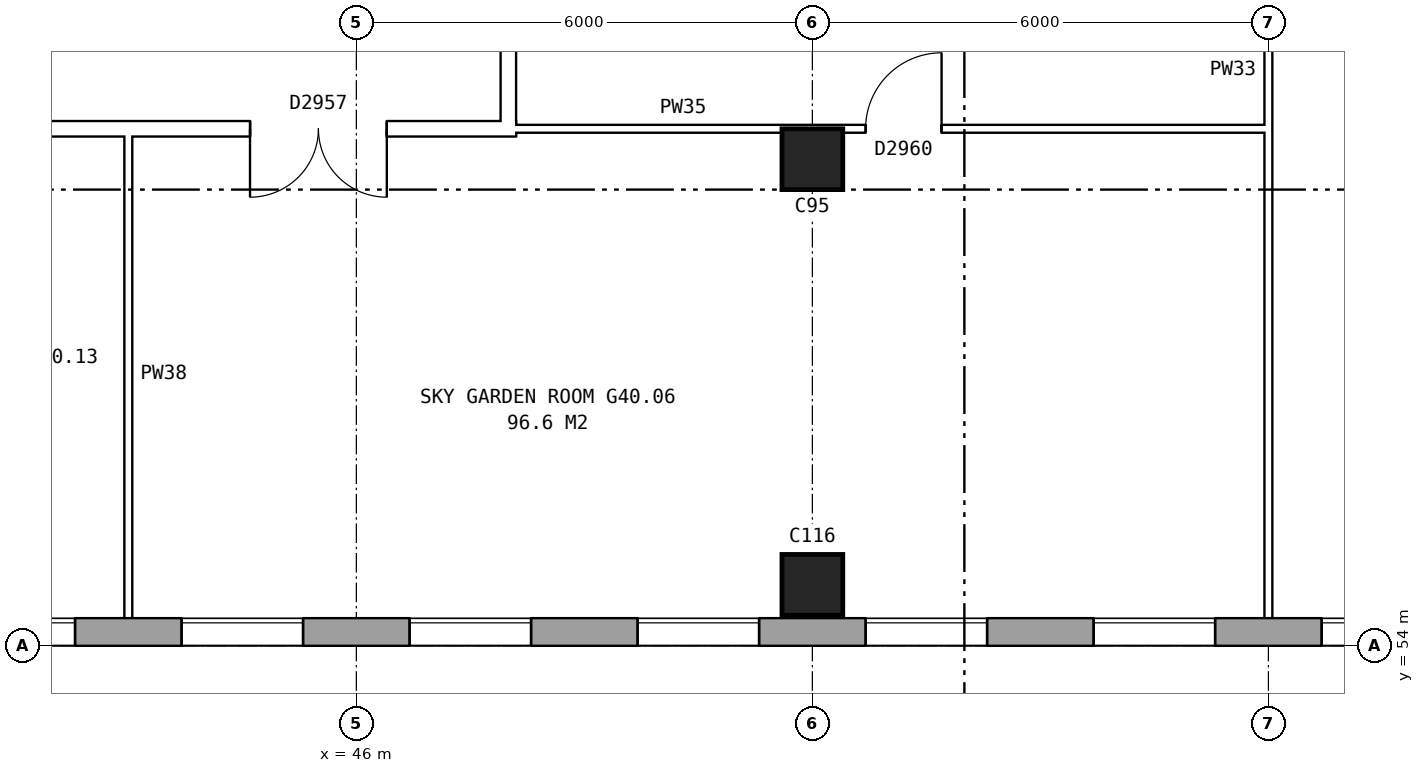
"""IFC4 building model, lengths in metres.
Left out: names, types, materials, properties, quantities, classifications, styles, units other than length and angle.
Written with IfcOpenShell. Run it as: python <this file> out.ifc"""

import sys

from ifc_helpers import new_model, si_unit, direction, frame, frame_2d, origin, origin_2d, place, context, subcontext, project, spatial, rectangle, extrude, element, fill, save


model = new_model("IFC4")
c1 = context("Model", 3, precision=1e-05, world=origin(), true_north=direction((0.0, 1.0)))
c2 = subcontext(c1, "Body", "Model", "MODEL_VIEW")
j1 = project(units=[si_unit("LENGTHUNIT", "METRE"), si_unit("PLANEANGLEUNIT", "RADIAN")], contexts=[c1])
p1 = place(None, origin())
s1 = spatial("IfcSite", under=j1, at=p1, CompositionType="ELEMENT")
p2 = place(p1, origin())
s2 = spatial("IfcBuilding", under=s1, at=p2, CompositionType="ELEMENT")
p3 = place(p2, frame((0.0, 0.0, 142.3)))
s3 = spatial("IfcBuildingStorey", under=s2, at=p3, CompositionType="ELEMENT", Elevation=142.3)
for number, where, z_axis, x_axis in (
    (1, (52.0, 54.8, 0.0), (0.0, 0.0, 1.0), (1.0, 0.0, 0.0)),
    (2, (52.0, 60.4, 0.0), (0.0, 0.0, 1.0), (1.0, 0.0, 0.0)),
):
    element("IfcColumn", number, at=place(p3, frame(where, z_axis=z_axis, x_axis=x_axis)), inside=s3, PredefinedType="COLUMN", context=c2, shape_type="SweptSolid", body=[
        extrude(rectangle(XDim=0.8, YDim=0.8, at=origin_2d()), origin(), (0.0, 0.0, 1.0), 5.6),
    ])
p4 = place(p3, frame((31.575, 54.18, 0.0), z_axis=(0.0, 0.0, 1.0), x_axis=(1.0, 0.0, 0.0)))
e3 = element("IfcWall", 3, at=p4, inside=s3, PredefinedType="STANDARD", context=c2, shape_type="SweptSolid", body=[
    extrude(rectangle(XDim=41.351, YDim=0.36, at=frame_2d((20.675, 0.0))), origin(), (0.0, 0.0, 1.0), 5.6),
])
p5 = place(p4, frame((3.125, 0.0, 0.15)))
e4 = element("IfcOpeningElement", 4, at=p5, cuts=e3, PredefinedType="OPENING", context=c2, shape_type="SweptSolid", body=[
    extrude(rectangle(XDim=1.6, YDim=2.4, at=frame_2d((0.8, 1.2))), frame((0.0, 0.19, 0.0), z_axis=(0.0, -1.0, 0.0), x_axis=(1.0, 0.0, 0.0)), (0.0, 0.0, 1.0), 0.38),
])
p6 = place(p4, frame((6.125, 0.0, 0.15)))
e5 = element("IfcOpeningElement", 5, at=p6, cuts=e3, PredefinedType="OPENING", context=c2, shape_type="SweptSolid", body=[
    extrude(rectangle(XDim=1.6, YDim=2.4, at=frame_2d((0.8, 1.2))), frame((0.0, 0.19, 0.0), z_axis=(0.0, -1.0, 0.0), x_axis=(1.0, 0.0, 0.0)), (0.0, 0.0, 1.0), 0.38),
])
p7 = place(p4, frame((9.125, 0.0, 0.15)))
e6 = element("IfcOpeningElement", 6, at=p7, cuts=e3, PredefinedType="OPENING", context=c2, shape_type="SweptSolid", body=[
    extrude(rectangle(XDim=1.6, YDim=2.4, at=frame_2d((0.8, 1.2))), frame((0.0, 0.19, 0.0), z_axis=(0.0, -1.0, 0.0), x_axis=(1.0, 0.0, 0.0)), (0.0, 0.0, 1.0), 0.38),
])
p8 = place(p4, frame((12.125, 0.0, 0.15)))
e7 = element("IfcOpeningElement", 7, at=p8, cuts=e3, PredefinedType="OPENING", context=c2, shape_type="SweptSolid", body=[
    extrude(rectangle(XDim=1.6, YDim=2.4, at=frame_2d((0.8, 1.2))), frame((0.0, 0.19, 0.0), z_axis=(0.0, -1.0, 0.0), x_axis=(1.0, 0.0, 0.0)), (0.0, 0.0, 1.0), 0.38),
])
p9 = place(p4, frame((15.125, 0.0, 0.15)))
e8 = element("IfcOpeningElement", 8, at=p9, cuts=e3, PredefinedType="OPENING", context=c2, shape_type="SweptSolid", body=[
    extrude(rectangle(XDim=1.6, YDim=2.4, at=frame_2d((0.8, 1.2))), frame((0.0, 0.19, 0.0), z_axis=(0.0, -1.0, 0.0), x_axis=(1.0, 0.0, 0.0)), (0.0, 0.0, 1.0), 0.38),
])
p10 = place(p4, frame((18.125, 0.0, 0.15)))
e9 = element("IfcOpeningElement", 9, at=p10, cuts=e3, PredefinedType="OPENING", context=c2, shape_type="SweptSolid", body=[
    extrude(rectangle(XDim=1.6, YDim=2.4, at=frame_2d((0.8, 1.2))), frame((0.0, 0.19, 0.0), z_axis=(0.0, -1.0, 0.0), x_axis=(1.0, 0.0, 0.0)), (0.0, 0.0, 1.0), 0.38),
])
p11 = place(p4, frame((21.125, 0.0, 0.15)))
e10 = element("IfcOpeningElement", 10, at=p11, cuts=e3, PredefinedType="OPENING", context=c2, shape_type="SweptSolid", body=[
    extrude(rectangle(XDim=1.6, YDim=2.4, at=frame_2d((0.8, 1.2))), frame((0.0, 0.19, 0.0), z_axis=(0.0, -1.0, 0.0), x_axis=(1.0, 0.0, 0.0)), (0.0, 0.0, 1.0), 0.38),
])
p12 = place(p4, frame((24.125, 0.0, 0.15)))
e11 = element("IfcOpeningElement", 11, at=p12, cuts=e3, PredefinedType="OPENING", context=c2, shape_type="SweptSolid", body=[
    extrude(rectangle(XDim=1.6, YDim=2.4, at=frame_2d((0.8, 1.2))), frame((0.0, 0.19, 0.0), z_axis=(0.0, -1.0, 0.0), x_axis=(1.0, 0.0, 0.0)), (0.0, 0.0, 1.0), 0.38),
])
p13 = place(p4, frame((27.125, 0.0, 0.15)))
e12 = element("IfcOpeningElement", 12, at=p13, cuts=e3, PredefinedType="OPENING", context=c2, shape_type="SweptSolid", body=[
    extrude(rectangle(XDim=1.6, YDim=2.4, at=frame_2d((0.8, 1.2))), frame((0.0, 0.19, 0.0), z_axis=(0.0, -1.0, 0.0), x_axis=(1.0, 0.0, 0.0)), (0.0, 0.0, 1.0), 0.38),
])
p14 = place(p4, frame((30.125, 0.0, 0.15)))
e13 = element("IfcOpeningElement", 13, at=p14, cuts=e3, PredefinedType="OPENING", context=c2, shape_type="SweptSolid", body=[
    extrude(rectangle(XDim=1.6, YDim=2.4, at=frame_2d((0.8, 1.2))), frame((0.0, 0.19, 0.0), z_axis=(0.0, -1.0, 0.0), x_axis=(1.0, 0.0, 0.0)), (0.0, 0.0, 1.0), 0.38),
])
p15 = place(p4, frame((33.125, 0.0, 0.15)))
e14 = element("IfcOpeningElement", 14, at=p15, cuts=e3, PredefinedType="OPENING", context=c2, shape_type="SweptSolid", body=[
    extrude(rectangle(XDim=1.6, YDim=2.4, at=frame_2d((0.8, 1.2))), frame((0.0, 0.19, 0.0), z_axis=(0.0, -1.0, 0.0), x_axis=(1.0, 0.0, 0.0)), (0.0, 0.0, 1.0), 0.38),
])
p16 = place(p4, frame((36.125, 0.0, 0.15)))
e15 = element("IfcOpeningElement", 15, at=p16, cuts=e3, PredefinedType="OPENING", context=c2, shape_type="SweptSolid", body=[
    extrude(rectangle(XDim=1.6, YDim=2.4, at=frame_2d((0.8, 1.2))), frame((0.0, 0.19, 0.0), z_axis=(0.0, -1.0, 0.0), x_axis=(1.0, 0.0, 0.0)), (0.0, 0.0, 1.0), 0.38),
])
p17 = place(p4, frame((39.125, 0.0, 0.15)))
e16 = element("IfcOpeningElement", 16, at=p17, cuts=e3, PredefinedType="OPENING", context=c2, shape_type="SweptSolid", body=[
    extrude(rectangle(XDim=1.6, YDim=2.4, at=frame_2d((0.8, 1.2))), frame((0.0, 0.19, 0.0), z_axis=(0.0, -1.0, 0.0), x_axis=(1.0, 0.0, 0.0)), (0.0, 0.0, 1.0), 0.38),
])
p18 = place(p3, frame((28.74, 60.8, 0.0), z_axis=(0.0, 0.0, 1.0), x_axis=(1.0, 0.0, 0.0)))
e17 = element("IfcWall", 17, at=p18, inside=s3, PredefinedType="PARTITIONING", context=c2, shape_type="SweptSolid", body=[
    extrude(rectangle(XDim=19.362, YDim=0.2, at=frame_2d((9.681, 0.0))), origin(), (0.0, 0.0, 1.0), 5.6),
])
p19 = place(p18, frame((3.69, 0.0, 0.0)))
e18 = element("IfcOpeningElement", 18, at=p19, cuts=e17, PredefinedType="OPENING", context=c2, shape_type="SweptSolid", body=[
    extrude(rectangle(XDim=1.0, YDim=2.1, at=frame_2d((0.5, 1.05))), frame((0.0, 0.11, 0.0), z_axis=(0.0, -1.0, 0.0), x_axis=(1.0, 0.0, 0.0)), (0.0, 0.0, 1.0), 0.22),
])
p20 = place(p18, frame((11.96, 0.0, 0.0)))
e19 = element("IfcOpeningElement", 19, at=p20, cuts=e17, PredefinedType="OPENING", context=c2, shape_type="SweptSolid", body=[
    extrude(rectangle(XDim=1.0, YDim=2.1, at=frame_2d((0.5, 1.05))), frame((0.0, 0.11, 0.0), z_axis=(0.0, -1.0, 0.0), x_axis=(1.0, 0.0, 0.0)), (0.0, 0.0, 1.0), 0.22),
])
p21 = place(p18, frame((15.861, 0.0, 0.0)))
e20 = element("IfcOpeningElement", 20, at=p21, cuts=e17, PredefinedType="OPENING", context=c2, shape_type="SweptSolid", body=[
    extrude(rectangle(XDim=1.8, YDim=2.1, at=frame_2d((0.9, 1.05))), frame((0.0, 0.11, 0.0), z_axis=(0.0, -1.0, 0.0), x_axis=(1.0, 0.0, 0.0)), (0.0, 0.0, 1.0), 0.22),
])
p22 = place(p3, frame((47.9, 60.8, 0.0), z_axis=(0.0, 0.0, 1.0), x_axis=(1.0, 0.0, 0.0)))
e21 = element("IfcWall", 21, at=p22, inside=s3, PredefinedType="PARTITIONING", context=c2, shape_type="SweptSolid", body=[
    extrude(rectangle(XDim=10.15, YDim=0.1, at=frame_2d((5.075, 0.0))), origin(), (0.0, 0.0, 1.0), 5.6),
])
p23 = place(p22, frame((4.8, 0.0, 0.0)))
e22 = element("IfcOpeningElement", 22, at=p23, cuts=e21, PredefinedType="OPENING", context=c2, shape_type="SweptSolid", body=[
    extrude(rectangle(XDim=1.0, YDim=2.1, at=frame_2d((0.5, 1.05))), frame((0.0, 0.06, 0.0), z_axis=(0.0, -1.0, 0.0), x_axis=(1.0, 0.0, 0.0)), (0.0, 0.0, 1.0), 0.12),
])
p24 = place(p3, frame((43.0, 54.24, 0.0), z_axis=(0.0, 0.0, 1.0), x_axis=(0.0, 1.0, 0.0)))
e23 = element("IfcWall", 23, at=p24, inside=s3, PredefinedType="PARTITIONING", context=c2, shape_type="SweptSolid", body=[
    extrude(rectangle(XDim=6.66, YDim=0.1, at=frame_2d((3.33, 0.0))), origin(), (0.0, 0.0, 1.0), 5.6),
])
p25 = place(p3, frame((48.0, 60.7, 0.0), z_axis=(0.0, 0.0, 1.0), x_axis=(0.0, 1.0, 0.0)))
e24 = element("IfcWall", 24, at=p25, inside=s3, PredefinedType="PARTITIONING", context=c2, shape_type="SweptSolid", body=[
    extrude(rectangle(XDim=3.2, YDim=0.2, at=frame_2d((1.6, 0.0))), origin(), (0.0, 0.0, 1.0), 5.6),
])
p26 = place(p3, frame((58.0, 54.24, 0.0), z_axis=(0.0, 0.0, 1.0), x_axis=(0.0, 1.0, 0.0)))
e25 = element("IfcWall", 25, at=p26, inside=s3, PredefinedType="PARTITIONING", context=c2, shape_type="SweptSolid", body=[
    extrude(rectangle(XDim=14.66, YDim=0.1, at=frame_2d((7.33, 0.0))), origin(), (0.0, 0.0, 1.0), 5.6),
])
p27 = place(p7, origin())
e26 = element("IfcWindow", 26, at=p27, inside=s3, PartitioningType="SINGLE_PANEL", PredefinedType="WINDOW", context=c2, shape_type="SweptSolid", body=[
    extrude(rectangle(XDim=1.6, YDim=2.4, at=frame_2d((0.8, 1.2))), frame((0.0, 0.15, 0.0), z_axis=(0.0, -1.0, 0.0), x_axis=(1.0, 0.0, 0.0)), (0.0, 0.0, 1.0), 0.06),
])
fill(e6, e26)
p28 = place(p8, origin())
e27 = element("IfcWindow", 27, at=p28, inside=s3, PartitioningType="SINGLE_PANEL", PredefinedType="WINDOW", context=c2, shape_type="SweptSolid", body=[
    extrude(rectangle(XDim=1.6, YDim=2.4, at=frame_2d((0.8, 1.2))), frame((0.0, 0.15, 0.0), z_axis=(0.0, -1.0, 0.0), x_axis=(1.0, 0.0, 0.0)), (0.0, 0.0, 1.0), 0.06),
])
fill(e7, e27)
p29 = place(p9, origin())
e28 = element("IfcWindow", 28, at=p29, inside=s3, PartitioningType="SINGLE_PANEL", PredefinedType="WINDOW", context=c2, shape_type="SweptSolid", body=[
    extrude(rectangle(XDim=1.6, YDim=2.4, at=frame_2d((0.8, 1.2))), frame((0.0, 0.15, 0.0), z_axis=(0.0, -1.0, 0.0), x_axis=(1.0, 0.0, 0.0)), (0.0, 0.0, 1.0), 0.06),
])
fill(e8, e28)
p30 = place(p10, origin())
e29 = element("IfcWindow", 29, at=p30, inside=s3, PartitioningType="SINGLE_PANEL", PredefinedType="WINDOW", context=c2, shape_type="SweptSolid", body=[
    extrude(rectangle(XDim=1.6, YDim=2.4, at=frame_2d((0.8, 1.2))), frame((0.0, 0.15, 0.0), z_axis=(0.0, -1.0, 0.0), x_axis=(1.0, 0.0, 0.0)), (0.0, 0.0, 1.0), 0.06),
])
fill(e9, e29)
p31 = place(p11, origin())
e30 = element("IfcWindow", 30, at=p31, inside=s3, PartitioningType="SINGLE_PANEL", PredefinedType="WINDOW", context=c2, shape_type="SweptSolid", body=[
    extrude(rectangle(XDim=1.6, YDim=2.4, at=frame_2d((0.8, 1.2))), frame((0.0, 0.15, 0.0), z_axis=(0.0, -1.0, 0.0), x_axis=(1.0, 0.0, 0.0)), (0.0, 0.0, 1.0), 0.06),
])
fill(e10, e30)
p32 = place(p12, origin())
e31 = element("IfcWindow", 31, at=p32, inside=s3, PartitioningType="SINGLE_PANEL", PredefinedType="WINDOW", context=c2, shape_type="SweptSolid", body=[
    extrude(rectangle(XDim=1.6, YDim=2.4, at=frame_2d((0.8, 1.2))), frame((0.0, 0.15, 0.0), z_axis=(0.0, -1.0, 0.0), x_axis=(1.0, 0.0, 0.0)), (0.0, 0.0, 1.0), 0.06),
])
fill(e11, e31)
p33 = place(p13, origin())
e32 = element("IfcWindow", 32, at=p33, inside=s3, PartitioningType="SINGLE_PANEL", PredefinedType="WINDOW", context=c2, shape_type="SweptSolid", body=[
    extrude(rectangle(XDim=1.6, YDim=2.4, at=frame_2d((0.8, 1.2))), frame((0.0, 0.15, 0.0), z_axis=(0.0, -1.0, 0.0), x_axis=(1.0, 0.0, 0.0)), (0.0, 0.0, 1.0), 0.06),
])
fill(e12, e32)
p34 = place(p21, frame((1.8, 0.0, 0.0), z_axis=(0.0, 0.0, 1.0), x_axis=(-1.0, 0.0, 0.0)))
e33 = element("IfcDoor", 33, at=p34, inside=s3, OperationType="DOUBLE_DOOR_SINGLE_SWING", PredefinedType="DOOR", context=c2, shape_type="SweptSolid", body=[
    extrude(rectangle(XDim=1.8, YDim=2.1, at=frame_2d((0.9, 1.05))), frame((0.0, 0.025, 0.0), z_axis=(0.0, -1.0, 0.0), x_axis=(1.0, 0.0, 0.0)), (0.0, 0.0, 1.0), 0.05),
])
fill(e20, e33)
p35 = place(p23, origin())
e34 = element("IfcDoor", 34, at=p35, inside=s3, OperationType="SINGLE_SWING_RIGHT", PredefinedType="DOOR", context=c2, shape_type="SweptSolid", body=[
    extrude(rectangle(XDim=1.0, YDim=2.1, at=frame_2d((0.5, 1.05))), frame((0.0, 0.025, 0.0), z_axis=(0.0, -1.0, 0.0), x_axis=(1.0, 0.0, 0.0)), (0.0, 0.0, 1.0), 0.05),
])
fill(e22, e34)
save(model, sys.argv[1])
